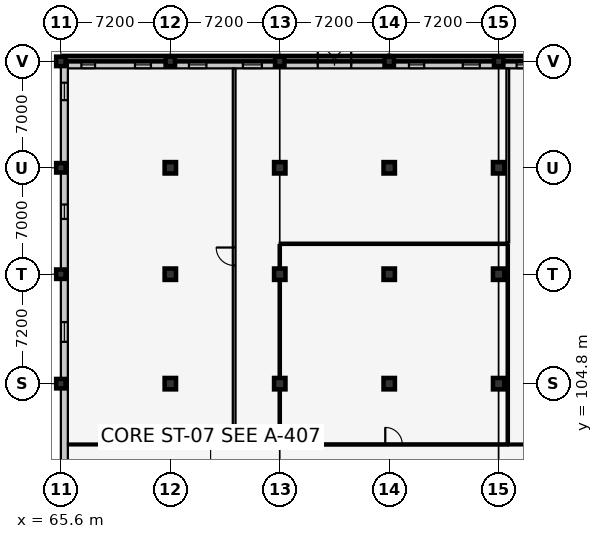
"""IFC4 building model, lengths in metres.
Left out: names, types, materials, properties, quantities, classifications, styles, units other than length and angle.
Written with IfcOpenShell. Run it as: python <this file> out.ifc"""

import sys

from ifc_helpers import new_model, si_unit, direction, frame, frame_2d, origin, origin_2d, place, context, subcontext, project, spatial, rectangle, circle, extrude, element, fill, save


model = new_model("IFC4")
c1 = context("Model", 3, precision=1e-05, world=origin(), true_north=direction((0.0, 1.0)))
c2 = subcontext(c1, "Body", "Model", "MODEL_VIEW")
j1 = project(units=[si_unit("LENGTHUNIT", "METRE"), si_unit("PLANEANGLEUNIT", "RADIAN")], contexts=[c1])
p1 = place(None, origin())
s1 = spatial("IfcSite", under=j1, at=p1, CompositionType="ELEMENT")
p2 = place(p1, origin())
s2 = spatial("IfcBuilding", under=s1, at=p2, CompositionType="ELEMENT")
p3 = place(p2, origin())
s3 = spatial("IfcBuildingStorey", under=s2, at=p3, CompositionType="ELEMENT", Elevation=0.0)
for number, where, z_axis, x_axis in (
    (1, (65.6, 104.8, 0.0), (0.0, 0.0, 1.0), (1.0, 0.0, 0.0)),
    (2, (65.6, 112.0, 0.0), (0.0, 0.0, 1.0), (1.0, 0.0, 0.0)),
    (3, (65.6, 119.0, 0.0), (0.0, 0.0, 1.0), (1.0, 0.0, 0.0)),
    (4, (65.6, 126.0, 0.0), (0.0, 0.0, 1.0), (1.0, 0.0, 0.0)),
):
    element("IfcColumn", number, at=place(p3, frame(where, z_axis=z_axis, x_axis=x_axis)), inside=s3, PredefinedType="COLUMN", context=c2, shape_type="SweptSolid", body=[
        extrude(rectangle(XDim=0.62, YDim=0.62, at=origin_2d()), origin(), (0.0, 0.0, 1.0), 5.4),
    ])
for number, where, z_axis, x_axis in (
    (5, (72.8, 104.8, 0.0), (0.0, 0.0, 1.0), (1.0, 0.0, 0.0)),
    (6, (72.8, 112.0, 0.0), (0.0, 0.0, 1.0), (1.0, 0.0, 0.0)),
    (7, (72.8, 119.0, 0.0), (0.0, 0.0, 1.0), (1.0, 0.0, 0.0)),
):
    element("IfcColumn", number, at=place(p3, frame(where, z_axis=z_axis, x_axis=x_axis)), inside=s3, PredefinedType="COLUMN", context=c2, shape_type="SweptSolid", body=[
        extrude(circle(Radius=0.375, at=origin_2d()), origin(), (0.0, 0.0, 1.0), 5.4),
    ])
p4 = place(p3, frame((72.8, 126.0, 0.0), z_axis=(0.0, 0.0, 1.0), x_axis=(1.0, 0.0, 0.0)))
e8 = element("IfcColumn", 8, at=p4, inside=s3, PredefinedType="COLUMN", context=c2, shape_type="SweptSolid", body=[
    extrude(rectangle(XDim=0.62, YDim=0.62, at=origin_2d()), origin(), (0.0, 0.0, 1.0), 5.4),
])
for number, where, z_axis, x_axis in (
    (9, (80.0, 104.8, 0.0), (0.0, 0.0, 1.0), (1.0, 0.0, 0.0)),
    (10, (80.0, 112.0, 0.0), (0.0, 0.0, 1.0), (1.0, 0.0, 0.0)),
    (11, (80.0, 119.0, 0.0), (0.0, 0.0, 1.0), (1.0, 0.0, 0.0)),
):
    element("IfcColumn", number, at=place(p3, frame(where, z_axis=z_axis, x_axis=x_axis)), inside=s3, PredefinedType="COLUMN", context=c2, shape_type="SweptSolid", body=[
        extrude(circle(Radius=0.375, at=origin_2d()), origin(), (0.0, 0.0, 1.0), 5.4),
    ])
p5 = place(p3, frame((80.0, 126.0, 0.0), z_axis=(0.0, 0.0, 1.0), x_axis=(1.0, 0.0, 0.0)))
e12 = element("IfcColumn", 12, at=p5, inside=s3, PredefinedType="COLUMN", context=c2, shape_type="SweptSolid", body=[
    extrude(rectangle(XDim=0.62, YDim=0.62, at=origin_2d()), origin(), (0.0, 0.0, 1.0), 5.4),
])
for number, where, z_axis, x_axis in (
    (13, (87.2, 104.8, 0.0), (0.0, 0.0, 1.0), (1.0, 0.0, 0.0)),
    (14, (87.2, 112.0, 0.0), (0.0, 0.0, 1.0), (1.0, 0.0, 0.0)),
    (15, (87.2, 119.0, 0.0), (0.0, 0.0, 1.0), (1.0, 0.0, 0.0)),
):
    element("IfcColumn", number, at=place(p3, frame(where, z_axis=z_axis, x_axis=x_axis)), inside=s3, PredefinedType="COLUMN", context=c2, shape_type="SweptSolid", body=[
        extrude(circle(Radius=0.375, at=origin_2d()), origin(), (0.0, 0.0, 1.0), 5.4),
    ])
p6 = place(p3, frame((87.2, 126.0, 0.0), z_axis=(0.0, 0.0, 1.0), x_axis=(1.0, 0.0, 0.0)))
e16 = element("IfcColumn", 16, at=p6, inside=s3, PredefinedType="COLUMN", context=c2, shape_type="SweptSolid", body=[
    extrude(rectangle(XDim=0.62, YDim=0.62, at=origin_2d()), origin(), (0.0, 0.0, 1.0), 5.4),
])
for number, where, z_axis, x_axis in (
    (17, (94.4, 104.8, 0.0), (0.0, 0.0, 1.0), (1.0, 0.0, 0.0)),
    (18, (94.4, 112.0, 0.0), (0.0, 0.0, 1.0), (1.0, 0.0, 0.0)),
    (19, (94.4, 119.0, 0.0), (0.0, 0.0, 1.0), (1.0, 0.0, 0.0)),
):
    element("IfcColumn", number, at=place(p3, frame(where, z_axis=z_axis, x_axis=x_axis)), inside=s3, PredefinedType="COLUMN", context=c2, shape_type="SweptSolid", body=[
        extrude(circle(Radius=0.375, at=origin_2d()), origin(), (0.0, 0.0, 1.0), 5.4),
    ])
p7 = place(p3, frame((94.4, 126.0, 0.0), z_axis=(0.0, 0.0, 1.0), x_axis=(1.0, 0.0, 0.0)))
e20 = element("IfcColumn", 20, at=p7, inside=s3, PredefinedType="COLUMN", context=c2, shape_type="SweptSolid", body=[
    extrude(rectangle(XDim=0.62, YDim=0.62, at=origin_2d()), origin(), (0.0, 0.0, 1.0), 5.4),
])
p8 = place(p3, frame((65.6, 125.77, 0.0), z_axis=(0.0, 0.0, 1.0), x_axis=(1.0, 0.0, 0.0)))
e21 = element("IfcWall", 21, at=p8, inside=s3, PredefinedType="SOLIDWALL", context=c2, shape_type="SweptSolid", body=[
    extrude(rectangle(XDim=43.2, YDim=0.46, at=frame_2d((21.6, 0.0))), origin(), (0.0, 0.0, 1.0), 4.455),
])
p9 = place(p8, frame((16.9, 0.0, 0.0)))
e22 = element("IfcOpeningElement", 22, at=p9, cuts=e21, PredefinedType="OPENING", context=c2, shape_type="SweptSolid", body=[
    extrude(rectangle(XDim=2.2, YDim=2.4, at=frame_2d((1.1, 1.2))), frame((0.0, 0.242, 0.0), z_axis=(0.0, -1.0, 0.0), x_axis=(1.0, 0.0, 0.0)), (0.0, 0.0, 1.0), 0.484),
])
p10 = place(p8, frame((1.35, 0.0, 0.9)))
e23 = element("IfcOpeningElement", 23, at=p10, cuts=e21, PredefinedType="OPENING", context=c2, shape_type="SweptSolid", body=[
    extrude(rectangle(XDim=0.9, YDim=1.6, at=frame_2d((0.45, 0.8))), frame((0.0, 0.242, 0.0), z_axis=(0.0, -1.0, 0.0), x_axis=(1.0, 0.0, 0.0)), (0.0, 0.0, 1.0), 0.484),
])
p11 = place(p8, frame((4.875, 0.0, 0.9)))
e24 = element("IfcOpeningElement", 24, at=p11, cuts=e21, PredefinedType="OPENING", context=c2, shape_type="SweptSolid", body=[
    extrude(rectangle(XDim=1.05, YDim=1.6, at=frame_2d((0.525, 0.8))), frame((0.0, 0.242, 0.0), z_axis=(0.0, -1.0, 0.0), x_axis=(1.0, 0.0, 0.0)), (0.0, 0.0, 1.0), 0.484),
])
p12 = place(p8, frame((8.425, 0.0, 0.9)))
e25 = element("IfcOpeningElement", 25, at=p12, cuts=e21, PredefinedType="OPENING", context=c2, shape_type="SweptSolid", body=[
    extrude(rectangle(XDim=1.15, YDim=1.6, at=frame_2d((0.575, 0.8))), frame((0.0, 0.242, 0.0), z_axis=(0.0, -1.0, 0.0), x_axis=(1.0, 0.0, 0.0)), (0.0, 0.0, 1.0), 0.484),
])
p13 = place(p8, frame((11.975, 0.0, 0.9)))
e26 = element("IfcOpeningElement", 26, at=p13, cuts=e21, PredefinedType="OPENING", context=c2, shape_type="SweptSolid", body=[
    extrude(rectangle(XDim=1.25, YDim=1.6, at=frame_2d((0.625, 0.8))), frame((0.0, 0.242, 0.0), z_axis=(0.0, -1.0, 0.0), x_axis=(1.0, 0.0, 0.0)), (0.0, 0.0, 1.0), 0.484),
])
p14 = place(p8, frame((22.9, 0.0, 0.9)))
e27 = element("IfcOpeningElement", 27, at=p14, cuts=e21, PredefinedType="OPENING", context=c2, shape_type="SweptSolid", body=[
    extrude(rectangle(XDim=1.0, YDim=1.75, at=frame_2d((0.5, 0.875))), frame((0.0, 0.242, 0.0), z_axis=(0.0, -1.0, 0.0), x_axis=(1.0, 0.0, 0.0)), (0.0, 0.0, 1.0), 0.484),
])
p15 = place(p8, frame((26.44, 0.0, 0.9)))
e28 = element("IfcOpeningElement", 28, at=p15, cuts=e21, PredefinedType="OPENING", context=c2, shape_type="SweptSolid", body=[
    extrude(rectangle(XDim=1.12, YDim=1.75, at=frame_2d((0.56, 0.875))), frame((0.0, 0.242, 0.0), z_axis=(0.0, -1.0, 0.0), x_axis=(1.0, 0.0, 0.0)), (0.0, 0.0, 1.0), 0.484),
])
p16 = place(p8, frame((29.98, 0.0, 0.9)))
e29 = element("IfcOpeningElement", 29, at=p16, cuts=e21, PredefinedType="OPENING", context=c2, shape_type="SweptSolid", body=[
    extrude(rectangle(XDim=1.24, YDim=1.75, at=frame_2d((0.62, 0.875))), frame((0.0, 0.242, 0.0), z_axis=(0.0, -1.0, 0.0), x_axis=(1.0, 0.0, 0.0)), (0.0, 0.0, 1.0), 0.484),
])
p17 = place(p8, frame((33.53, 0.0, 0.9)))
e30 = element("IfcOpeningElement", 30, at=p17, cuts=e21, PredefinedType="OPENING", context=c2, shape_type="SweptSolid", body=[
    extrude(rectangle(XDim=1.34, YDim=1.75, at=frame_2d((0.67, 0.875))), frame((0.0, 0.242, 0.0), z_axis=(0.0, -1.0, 0.0), x_axis=(1.0, 0.0, 0.0)), (0.0, 0.0, 1.0), 0.484),
])
p18 = place(p8, frame((37.08, 0.0, 0.9)))
e31 = element("IfcOpeningElement", 31, at=p18, cuts=e21, PredefinedType="OPENING", context=c2, shape_type="SweptSolid", body=[
    extrude(rectangle(XDim=1.44, YDim=1.75, at=frame_2d((0.72, 0.875))), frame((0.0, 0.242, 0.0), z_axis=(0.0, -1.0, 0.0), x_axis=(1.0, 0.0, 0.0)), (0.0, 0.0, 1.0), 0.484),
])
p19 = place(p8, frame((40.65, 0.0, 0.9)))
e32 = element("IfcOpeningElement", 32, at=p19, cuts=e21, PredefinedType="OPENING", context=c2, shape_type="SweptSolid", body=[
    extrude(rectangle(XDim=1.5, YDim=1.75, at=frame_2d((0.75, 0.875))), frame((0.0, 0.242, 0.0), z_axis=(0.0, -1.0, 0.0), x_axis=(1.0, 0.0, 0.0)), (0.0, 0.0, 1.0), 0.484),
])
p20 = place(p3, frame((65.83, 90.4, 0.0), z_axis=(0.0, 0.0, 1.0), x_axis=(0.0, 1.0, 0.0)))
e33 = element("IfcWall", 33, at=p20, inside=s3, PredefinedType="SOLIDWALL", context=c2, shape_type="SweptSolid", body=[
    extrude(rectangle(XDim=35.6, YDim=0.46, at=frame_2d((17.8, 0.0))), origin(), (0.0, 0.0, 1.0), 4.515),
])
p21 = place(p20, frame((2.7, 0.0, 0.0)))
e34 = element("IfcOpeningElement", 34, at=p21, cuts=e33, PredefinedType="OPENING", context=c2, shape_type="SweptSolid", body=[
    extrude(rectangle(XDim=1.8, YDim=2.3, at=frame_2d((0.9, 1.15))), frame((0.0, 0.242, 0.0), z_axis=(0.0, -1.0, 0.0), x_axis=(1.0, 0.0, 0.0)), (0.0, 0.0, 1.0), 0.484),
])
p22 = place(p20, frame((17.15, 0.0, 0.9)))
e35 = element("IfcOpeningElement", 35, at=p22, cuts=e33, PredefinedType="OPENING", context=c2, shape_type="SweptSolid", body=[
    extrude(rectangle(XDim=1.3, YDim=1.35, at=frame_2d((0.65, 0.675))), frame((0.0, 0.242, 0.0), z_axis=(0.0, -1.0, 0.0), x_axis=(1.0, 0.0, 0.0)), (0.0, 0.0, 1.0), 0.484),
])
p23 = place(p20, frame((25.236, 0.0, 0.9)))
e36 = element("IfcOpeningElement", 36, at=p23, cuts=e33, PredefinedType="OPENING", context=c2, shape_type="SweptSolid", body=[
    extrude(rectangle(XDim=0.95, YDim=1.45, at=frame_2d((0.475, 0.725))), frame((0.0, 0.242, 0.0), z_axis=(0.0, -1.0, 0.0), x_axis=(1.0, 0.0, 0.0)), (0.0, 0.0, 1.0), 0.484),
])
p24 = place(p20, frame((33.047, 0.0, 0.9)))
e37 = element("IfcOpeningElement", 37, at=p24, cuts=e33, PredefinedType="OPENING", context=c2, shape_type="SweptSolid", body=[
    extrude(rectangle(XDim=1.15, YDim=1.45, at=frame_2d((0.575, 0.725))), frame((0.0, 0.242, 0.0), z_axis=(0.0, -1.0, 0.0), x_axis=(1.0, 0.0, 0.0)), (0.0, 0.0, 1.0), 0.484),
])
p25 = place(p3, frame((65.8, 126.18, -0.8), z_axis=(0.0, 0.0, 1.0), x_axis=(1.0, 0.0, 0.0)))
e38 = element("IfcWall", 38, at=p25, inside=s3, PredefinedType="USERDEFINED", context=c2, shape_type="SweptSolid", body=[
    extrude(rectangle(XDim=21.4, YDim=0.36, at=frame_2d((10.7, 0.0))), origin(), (0.0, 0.0, 1.0), 1.35),
])
p26 = place(p3, frame((87.2, 126.18, -0.8), z_axis=(0.0, 0.0, 1.0), x_axis=(1.0, 0.0, 0.0)))
e39 = element("IfcWall", 39, at=p26, inside=s3, PredefinedType="USERDEFINED", context=c2, shape_type="SweptSolid", body=[
    extrude(rectangle(XDim=21.4, YDim=0.36, at=frame_2d((10.7, 0.0))), origin(), (0.0, 0.0, 1.0), 1.35),
])
p27 = place(p3, frame((77.0, 100.8, 0.0), z_axis=(0.0, 0.0, 1.0), x_axis=(0.0, 1.0, 0.0)))
e40 = element("IfcWall", 40, at=p27, inside=s3, PredefinedType="PARTITIONING", context=c2, shape_type="SweptSolid", body=[
    extrude(rectangle(XDim=24.73, YDim=0.18, at=frame_2d((12.365, 0.0))), origin(), (0.0, 0.0, 1.0), 5.12),
])
p28 = place(p27, frame((11.775, 0.0, 0.0)))
e41 = element("IfcOpeningElement", 41, at=p28, cuts=e40, PredefinedType="OPENING", context=c2, shape_type="SweptSolid", body=[
    extrude(rectangle(XDim=1.18, YDim=2.2, at=frame_2d((0.59, 1.1))), frame((0.0, 0.102, 0.0), z_axis=(0.0, -1.0, 0.0), x_axis=(1.0, 0.0, 0.0)), (0.0, 0.0, 1.0), 0.204),
])
p29 = place(p3, frame((66.07, 100.8, 0.0), z_axis=(0.0, 0.0, 1.0), x_axis=(1.0, 0.0, 0.0)))
e42 = element("IfcWall", 42, at=p29, inside=s3, PredefinedType="PARTITIONING", context=c2, shape_type="SweptSolid", body=[
    extrude(rectangle(XDim=10.83, YDim=0.125, at=frame_2d((5.415, 0.0))), origin(), (0.0, 0.0, 1.0), 5.12),
])
p30 = place(p3, frame((80.0, 100.8, 0.0), z_axis=(0.0, 0.0, 1.0), x_axis=(1.0, 0.0, 0.0)))
e43 = element("IfcWall", 43, at=p30, inside=s3, PredefinedType="PARTITIONING", context=c2, shape_type="SweptSolid", body=[
    extrude(rectangle(XDim=15.0, YDim=0.15, at=frame_2d((7.5, 0.0))), origin(), (0.0, 0.0, 1.0), 5.12),
])
p31 = place(p30, frame((6.94, 0.0, 0.0)))
e44 = element("IfcOpeningElement", 44, at=p31, cuts=e43, PredefinedType="OPENING", context=c2, shape_type="SweptSolid", body=[
    extrude(rectangle(XDim=1.12, YDim=2.15, at=frame_2d((0.56, 1.075))), frame((0.0, 0.087, 0.0), z_axis=(0.0, -1.0, 0.0), x_axis=(1.0, 0.0, 0.0)), (0.0, 0.0, 1.0), 0.174),
])
p32 = place(p3, frame((80.0, 114.0, 0.0), z_axis=(0.0, 0.0, 1.0), x_axis=(1.0, 0.0, 0.0)))
e45 = element("IfcWall", 45, at=p32, inside=s3, PredefinedType="PARTITIONING", context=c2, shape_type="SweptSolid", body=[
    extrude(rectangle(XDim=15.0, YDim=0.15, at=frame_2d((7.5, 0.0))), origin(), (0.0, 0.0, 1.0), 5.12),
])
p33 = place(p3, frame((80.0, 100.885, 0.0), z_axis=(0.0, 0.0, 1.0), x_axis=(0.0, 1.0, 0.0)))
e46 = element("IfcWall", 46, at=p33, inside=s3, PredefinedType="PARTITIONING", context=c2, shape_type="SweptSolid", body=[
    extrude(rectangle(XDim=13.03, YDim=0.15, at=frame_2d((6.515, 0.0))), origin(), (0.0, 0.0, 1.0), 4.495),
])
p34 = place(p3, frame((95.0, 100.885, 0.0), z_axis=(0.0, 0.0, 1.0), x_axis=(0.0, 1.0, 0.0)))
e47 = element("IfcWall", 47, at=p34, inside=s3, PredefinedType="PARTITIONING", context=c2, shape_type="SweptSolid", body=[
    extrude(rectangle(XDim=13.03, YDim=0.15, at=frame_2d((6.515, 0.0))), origin(), (0.0, 0.0, 1.0), 5.12),
])
p35 = place(p3, frame((95.0, 114.085, 0.0), z_axis=(0.0, 0.0, 1.0), x_axis=(0.0, 1.0, 0.0)))
e48 = element("IfcWall", 48, at=p35, inside=s3, PredefinedType="PARTITIONING", context=c2, shape_type="SweptSolid", body=[
    extrude(rectangle(XDim=11.445, YDim=0.18, at=frame_2d((5.723, 0.0))), origin(), (0.0, 0.0, 1.0), 5.16),
])
p36 = place(p3, frame((95.085, 100.8, 0.0), z_axis=(0.0, 0.0, 1.0), x_axis=(1.0, 0.0, 0.0)))
e49 = element("IfcWall", 49, at=p36, inside=s3, PredefinedType="PARTITIONING", context=c2, shape_type="SweptSolid", body=[
    extrude(rectangle(XDim=13.245, YDim=0.125, at=frame_2d((6.623, 0.0))), origin(), (0.0, 0.0, 1.0), 5.12),
])
p37 = place(p36, frame((6.083, 0.0, 0.0)))
e50 = element("IfcOpeningElement", 50, at=p37, cuts=e49, PredefinedType="OPENING", context=c2, shape_type="SweptSolid", body=[
    extrude(rectangle(XDim=1.08, YDim=2.15, at=frame_2d((0.54, 1.075))), frame((0.0, 0.074, 0.0), z_axis=(0.0, -1.0, 0.0), x_axis=(1.0, 0.0, 0.0)), (0.0, 0.0, 1.0), 0.149),
])
p38 = place(p9, origin())
e51 = element("IfcDoor", 51, at=p38, inside=s3, OperationType="DOUBLE_DOOR_SINGLE_SWING", PredefinedType="DOOR", context=c2, shape_type="SweptSolid", body=[
    extrude(rectangle(XDim=2.2, YDim=2.4, at=frame_2d((1.1, 1.2))), frame((0.0, 0.025, 0.0), z_axis=(0.0, -1.0, 0.0), x_axis=(1.0, 0.0, 0.0)), (0.0, 0.0, 1.0), 0.05),
])
fill(e22, e51)
p39 = place(p10, origin())
e52 = element("IfcWindow", 52, at=p39, inside=s3, PartitioningType="SINGLE_PANEL", PredefinedType="WINDOW", context=c2, shape_type="SweptSolid", body=[
    extrude(rectangle(XDim=0.9, YDim=1.6, at=frame_2d((0.45, 0.8))), frame((0.0, 0.03, 0.0), z_axis=(0.0, -1.0, 0.0), x_axis=(1.0, 0.0, 0.0)), (0.0, 0.0, 1.0), 0.06),
])
fill(e23, e52)
p40 = place(p11, origin())
e53 = element("IfcWindow", 53, at=p40, inside=s3, PartitioningType="SINGLE_PANEL", PredefinedType="WINDOW", context=c2, shape_type="SweptSolid", body=[
    extrude(rectangle(XDim=1.05, YDim=1.6, at=frame_2d((0.525, 0.8))), frame((0.0, 0.03, 0.0), z_axis=(0.0, -1.0, 0.0), x_axis=(1.0, 0.0, 0.0)), (0.0, 0.0, 1.0), 0.06),
])
fill(e24, e53)
p41 = place(p12, origin())
e54 = element("IfcWindow", 54, at=p41, inside=s3, PartitioningType="SINGLE_PANEL", PredefinedType="WINDOW", context=c2, shape_type="SweptSolid", body=[
    extrude(rectangle(XDim=1.15, YDim=1.6, at=frame_2d((0.575, 0.8))), frame((0.0, 0.03, 0.0), z_axis=(0.0, -1.0, 0.0), x_axis=(1.0, 0.0, 0.0)), (0.0, 0.0, 1.0), 0.06),
])
fill(e25, e54)
p42 = place(p13, origin())
e55 = element("IfcWindow", 55, at=p42, inside=s3, PartitioningType="SINGLE_PANEL", PredefinedType="WINDOW", context=c2, shape_type="SweptSolid", body=[
    extrude(rectangle(XDim=1.25, YDim=1.6, at=frame_2d((0.625, 0.8))), frame((0.0, 0.03, 0.0), z_axis=(0.0, -1.0, 0.0), x_axis=(1.0, 0.0, 0.0)), (0.0, 0.0, 1.0), 0.06),
])
fill(e26, e55)
p43 = place(p14, origin())
e56 = element("IfcWindow", 56, at=p43, inside=s3, PartitioningType="SINGLE_PANEL", PredefinedType="WINDOW", context=c2, shape_type="SweptSolid", body=[
    extrude(rectangle(XDim=1.0, YDim=1.75, at=frame_2d((0.5, 0.875))), frame((0.0, 0.03, 0.0), z_axis=(0.0, -1.0, 0.0), x_axis=(1.0, 0.0, 0.0)), (0.0, 0.0, 1.0), 0.06),
])
fill(e27, e56)
p44 = place(p15, origin())
e57 = element("IfcWindow", 57, at=p44, inside=s3, PartitioningType="SINGLE_PANEL", PredefinedType="WINDOW", context=c2, shape_type="SweptSolid", body=[
    extrude(rectangle(XDim=1.12, YDim=1.75, at=frame_2d((0.56, 0.875))), frame((0.0, 0.03, 0.0), z_axis=(0.0, -1.0, 0.0), x_axis=(1.0, 0.0, 0.0)), (0.0, 0.0, 1.0), 0.06),
])
fill(e28, e57)
p45 = place(p16, origin())
e58 = element("IfcWindow", 58, at=p45, inside=s3, PartitioningType="SINGLE_PANEL", PredefinedType="WINDOW", context=c2, shape_type="SweptSolid", body=[
    extrude(rectangle(XDim=1.24, YDim=1.75, at=frame_2d((0.62, 0.875))), frame((0.0, 0.03, 0.0), z_axis=(0.0, -1.0, 0.0), x_axis=(1.0, 0.0, 0.0)), (0.0, 0.0, 1.0), 0.06),
])
fill(e29, e58)
p46 = place(p22, origin())
e59 = element("IfcWindow", 59, at=p46, inside=s3, PartitioningType="SINGLE_PANEL", PredefinedType="WINDOW", context=c2, shape_type="SweptSolid", body=[
    extrude(rectangle(XDim=1.3, YDim=1.35, at=frame_2d((0.65, 0.675))), frame((0.0, 0.03, 0.0), z_axis=(0.0, -1.0, 0.0), x_axis=(1.0, 0.0, 0.0)), (0.0, 0.0, 1.0), 0.06),
])
fill(e35, e59)
p47 = place(p23, origin())
e60 = element("IfcWindow", 60, at=p47, inside=s3, PartitioningType="SINGLE_PANEL", PredefinedType="WINDOW", context=c2, shape_type="SweptSolid", body=[
    extrude(rectangle(XDim=0.95, YDim=1.45, at=frame_2d((0.475, 0.725))), frame((0.0, 0.03, 0.0), z_axis=(0.0, -1.0, 0.0), x_axis=(1.0, 0.0, 0.0)), (0.0, 0.0, 1.0), 0.06),
])
fill(e36, e60)
p48 = place(p24, origin())
e61 = element("IfcWindow", 61, at=p48, inside=s3, PartitioningType="SINGLE_PANEL", PredefinedType="WINDOW", context=c2, shape_type="SweptSolid", body=[
    extrude(rectangle(XDim=1.15, YDim=1.45, at=frame_2d((0.575, 0.725))), frame((0.0, 0.03, 0.0), z_axis=(0.0, -1.0, 0.0), x_axis=(1.0, 0.0, 0.0)), (0.0, 0.0, 1.0), 0.06),
])
fill(e37, e61)
p49 = place(p28, origin())
e62 = element("IfcDoor", 62, at=p49, inside=s3, OperationType="SINGLE_SWING_RIGHT", PredefinedType="DOOR", context=c2, shape_type="SweptSolid", body=[
    extrude(rectangle(XDim=1.18, YDim=2.2, at=frame_2d((0.59, 1.1))), frame((0.0, 0.025, 0.0), z_axis=(0.0, -1.0, 0.0), x_axis=(1.0, 0.0, 0.0)), (0.0, 0.0, 1.0), 0.05),
])
fill(e41, e62)
p50 = place(p31, origin())
e63 = element("IfcDoor", 63, at=p50, inside=s3, OperationType="SINGLE_SWING_LEFT", PredefinedType="DOOR", context=c2, shape_type="SweptSolid", body=[
    extrude(rectangle(XDim=1.12, YDim=2.15, at=frame_2d((0.56, 1.075))), frame((0.0, 0.025, 0.0), z_axis=(0.0, -1.0, 0.0), x_axis=(1.0, 0.0, 0.0)), (0.0, 0.0, 1.0), 0.05),
])
fill(e44, e63)
save(model, sys.argv[1])
